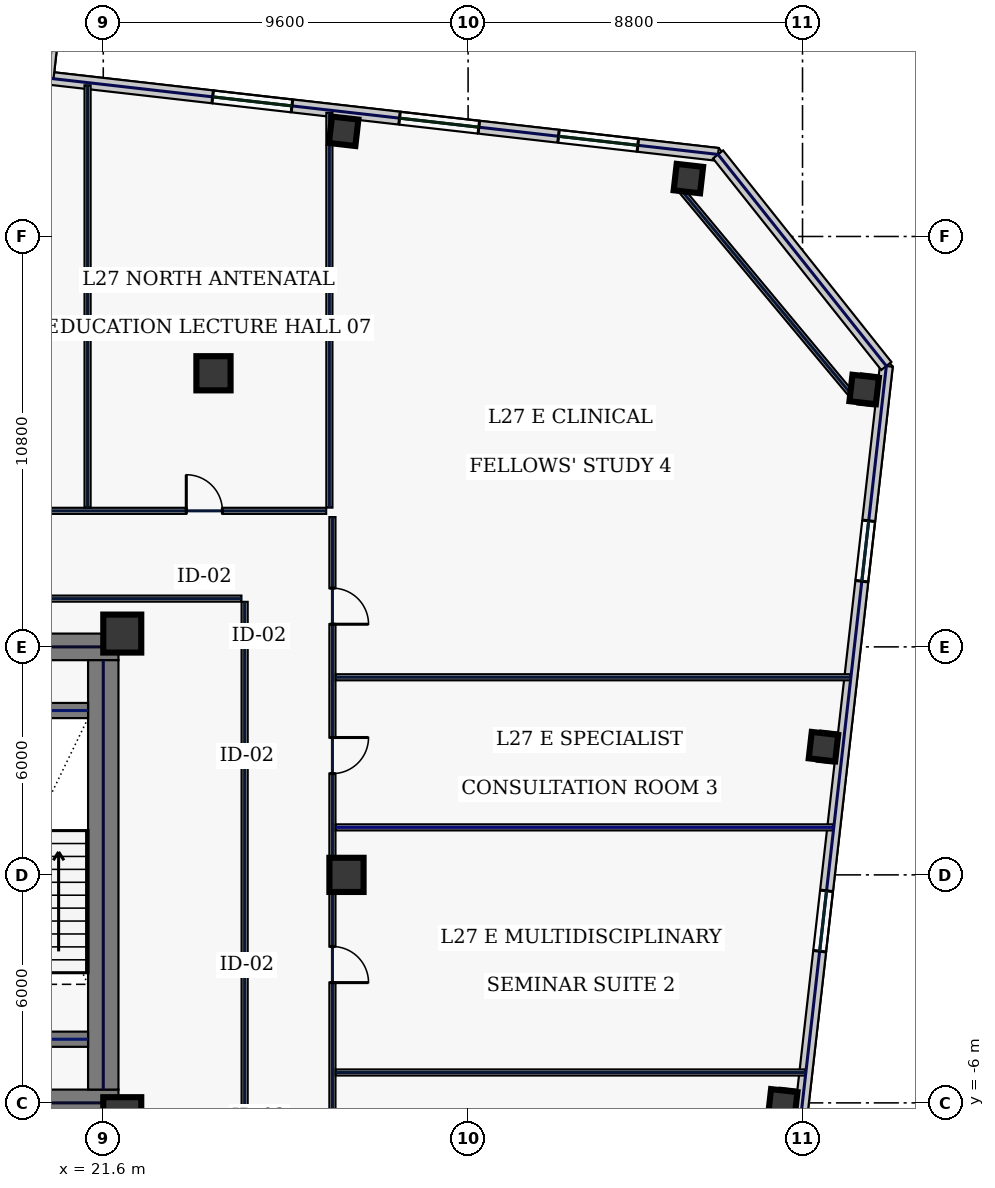
"""IFC4 building model, lengths in metres.
Left out: names, types, materials, properties, quantities, classifications, styles, units other than length and angle.
Written with IfcOpenShell. Run it as: python <this file> out.ifc"""

import sys

from ifc_helpers import new_model, si_unit, direction, frame, frame_2d, origin, origin_2d, place, context, subcontext, project, spatial, rectangle, hollow_rectangle, extrude, element, fill, save


model = new_model("IFC4")
c1 = context("Model", 3, precision=1e-05, world=origin(), true_north=direction((0.0, 1.0)))
c2 = subcontext(c1, "Body", "Model", "MODEL_VIEW")
j1 = project(units=[si_unit("LENGTHUNIT", "METRE"), si_unit("PLANEANGLEUNIT", "RADIAN")], contexts=[c1])
p1 = place(None, origin())
s1 = spatial("IfcSite", under=j1, at=p1, CompositionType="ELEMENT")
p2 = place(p1, origin())
s2 = spatial("IfcBuilding", under=s1, at=p2, CompositionType="ELEMENT")
p3 = place(p2, frame((0.0, 0.0, 121.4)))
s3 = spatial("IfcBuildingStorey", under=s2, at=p3, CompositionType="ELEMENT", Elevation=121.4)
for number, where, z_axis, x_axis in (
    (1, (10.45, 6.0, 0.0), (0.0, 0.0, 1.0), (1.0, 0.0, 0.0)),
    (2, (10.45, -6.0, 0.0), (0.0, 0.0, 1.0), (1.0, 0.0, 0.0)),
):
    element("IfcWall", number, at=place(p3, frame(where, z_axis=z_axis, x_axis=x_axis)), inside=s3, PredefinedType="SHEAR", context=c2, shape_type="SweptSolid", body=[
        extrude(rectangle(XDim=11.55, YDim=0.7, at=frame_2d((5.775, 0.0))), origin(), (0.0, 0.0, 1.0), 3.74),
    ])
p4 = place(p3, frame((21.6, -5.65, 0.0), z_axis=(0.0, 0.0, 1.0), x_axis=(0.0, 1.0, 0.0)))
e3 = element("IfcWall", 3, at=p4, inside=s3, PredefinedType="SHEAR", context=c2, shape_type="SweptSolid", body=[
    extrude(rectangle(XDim=11.3, YDim=0.8, at=frame_2d((5.65, 0.0))), origin(), (0.0, 0.0, 1.0), 3.74),
])
for number, where, z_axis, x_axis in (
    (4, (17.8, -4.325, 0.0), (0.0, 0.0, 1.0), (1.0, 0.0, 0.0)),
    (5, (17.8, 4.325, 0.0), (0.0, 0.0, 1.0), (1.0, 0.0, 0.0)),
):
    element("IfcWall", number, at=place(p3, frame(where, z_axis=z_axis, x_axis=x_axis)), inside=s3, PredefinedType="SHEAR", context=c2, shape_type="SweptSolid", body=[
        extrude(rectangle(XDim=3.4, YDim=0.4, at=frame_2d((1.7, 0.0))), origin(), (0.0, 0.0, 1.0), 3.74),
    ])
for number, where, z_axis, x_axis in (
    (6, (22.1, -6.35, 0.0), (0.0, 0.0, 1.0), (1.0, 0.0, 0.0)),
    (7, (22.1, 6.35, 0.0), (0.0, 0.0, 1.0), (1.0, 0.0, 0.0)),
):
    element("IfcColumn", number, at=place(p3, frame(where, z_axis=z_axis, x_axis=x_axis)), inside=s3, PredefinedType="COLUMN", context=c2, shape_type="SweptSolid", body=[
        extrude(hollow_rectangle(XDim=1.0, YDim=1.0, WallThickness=0.045, at=origin_2d()), origin(), (0.0, 0.0, 1.0), 3.74),
    ])
for number, where, z_axis, x_axis in (
    (8, (24.5, 13.2, 0.0), (0.0, 0.0, 1.0), (1.0, 0.0, 0.0)),
    (9, (28.0, 0.0, 0.0), (0.0, 0.0, 1.0), (1.0, 0.0, 0.0)),
):
    element("IfcColumn", number, at=place(p3, frame(where, z_axis=z_axis, x_axis=x_axis)), inside=s3, PredefinedType="COLUMN", context=c2, shape_type="SweptSolid", body=[
        extrude(hollow_rectangle(XDim=0.9, YDim=0.9, WallThickness=0.04, at=origin_2d()), origin(), (0.0, 0.0, 1.0), 3.74),
    ])
for number, where, z_axis, x_axis in (
    (10, (36.997, 18.323, 0.0), (0.0, 0.0, 1.0), (0.994, -0.113, 0.0)),
    (11, (27.926, 19.568, 0.0), (0.0, 0.0, 1.0), (0.994, -0.113, 0.0)),
    (12, (39.48, -6.025, 0.0), (0.0, 0.0, 1.0), (0.994, -0.113, 0.0)),
    (13, (40.551, 3.375, 0.0), (0.0, 0.0, 1.0), (0.994, -0.113, 0.0)),
    (14, (41.622, 12.774, 0.0), (0.0, 0.0, 1.0), (0.994, -0.113, 0.0)),
):
    element("IfcColumn", number, at=place(p3, frame(where, z_axis=z_axis, x_axis=x_axis)), inside=s3, PredefinedType="COLUMN", context=c2, shape_type="SweptSolid", body=[
        extrude(hollow_rectangle(XDim=0.7, YDim=0.7, WallThickness=0.032, at=origin_2d()), origin(), (0.0, 0.0, 1.0), 3.74),
    ])
p5 = place(p3, frame((37.777, 18.958, 0.0), z_axis=(0.0, 0.0, 1.0), x_axis=(-0.993570699365, 0.113213362125, 0.0)))
e15 = element("IfcWall", 15, at=p5, inside=s3, PredefinedType="STANDARD", context=c2, shape_type="SweptSolid", body=[
    extrude(rectangle(XDim=17.75, YDim=0.34, at=frame_2d((8.875, 0.0))), origin(), (0.0, 0.0, 1.0), 3.74),
])
p6 = place(p5, frame((11.285, 0.0, 0.67)))
e16 = element("IfcOpeningElement", 16, at=p6, cuts=e15, PredefinedType="OPENING", context=c2, shape_type="SweptSolid", body=[
    extrude(rectangle(XDim=2.1, YDim=2.2, at=frame_2d((1.05, 1.1))), frame((0.0, 0.18, 0.0), z_axis=(0.0, -1.0, 0.0), x_axis=(1.0, 0.0, 0.0)), (0.0, 0.0, 1.0), 0.36),
])
p7 = place(p5, frame((6.336, 0.0, 0.67)))
e17 = element("IfcOpeningElement", 17, at=p7, cuts=e15, PredefinedType="OPENING", context=c2, shape_type="SweptSolid", body=[
    extrude(rectangle(XDim=2.1, YDim=2.2, at=frame_2d((1.05, 1.1))), frame((0.0, 0.18, 0.0), z_axis=(0.0, -1.0, 0.0), x_axis=(1.0, 0.0, 0.0)), (0.0, 0.0, 1.0), 0.36),
])
p8 = place(p5, frame((2.125, 0.0, 0.67)))
e18 = element("IfcOpeningElement", 18, at=p8, cuts=e15, PredefinedType="OPENING", context=c2, shape_type="SweptSolid", body=[
    extrude(rectangle(XDim=2.1, YDim=2.2, at=frame_2d((1.05, 1.1))), frame((0.0, 0.18, 0.0), z_axis=(0.0, -1.0, 0.0), x_axis=(1.0, 0.0, 0.0)), (0.0, 0.0, 1.0), 0.36),
])
p9 = place(p3, frame((37.768, -25.556, 0.0), z_axis=(0.0, 0.0, 1.0), x_axis=(0.113201605824, 0.993572038877, 0.0)))
e19 = element("IfcWall", 19, at=p9, inside=s3, PredefinedType="STANDARD", context=c2, shape_type="SweptSolid", body=[
    extrude(rectangle(XDim=39.2, YDim=0.34, at=frame_2d((19.6, 0.0))), origin(), (0.0, 0.0, 1.0), 3.74),
])
p10 = place(p9, frame((4.1, 0.0, 0.58)))
e20 = element("IfcOpeningElement", 20, at=p10, cuts=e19, PredefinedType="OPENING", context=c2, shape_type="SweptSolid", body=[
    extrude(rectangle(XDim=1.6, YDim=2.3, at=frame_2d((0.8, 1.15))), frame((0.0, 0.18, 0.0), z_axis=(0.0, -1.0, 0.0), x_axis=(1.0, 0.0, 0.0)), (0.0, 0.0, 1.0), 0.36),
])
p11 = place(p9, frame((13.9, 0.0, 0.58)))
e21 = element("IfcOpeningElement", 21, at=p11, cuts=e19, PredefinedType="OPENING", context=c2, shape_type="SweptSolid", body=[
    extrude(rectangle(XDim=1.6, YDim=2.3, at=frame_2d((0.8, 1.15))), frame((0.0, 0.18, 0.0), z_axis=(0.0, -1.0, 0.0), x_axis=(1.0, 0.0, 0.0)), (0.0, 0.0, 1.0), 0.36),
])
p12 = place(p9, frame((23.7, 0.0, 0.58)))
e22 = element("IfcOpeningElement", 22, at=p12, cuts=e19, PredefinedType="OPENING", context=c2, shape_type="SweptSolid", body=[
    extrude(rectangle(XDim=1.6, YDim=2.3, at=frame_2d((0.8, 1.15))), frame((0.0, 0.18, 0.0), z_axis=(0.0, -1.0, 0.0), x_axis=(1.0, 0.0, 0.0)), (0.0, 0.0, 1.0), 0.36),
])
p13 = place(p9, frame((33.5, 0.0, 0.58)))
e23 = element("IfcOpeningElement", 23, at=p13, cuts=e19, PredefinedType="OPENING", context=c2, shape_type="SweptSolid", body=[
    extrude(rectangle(XDim=1.6, YDim=2.3, at=frame_2d((0.8, 1.15))), frame((0.0, 0.18, 0.0), z_axis=(0.0, -1.0, 0.0), x_axis=(1.0, 0.0, 0.0)), (0.0, 0.0, 1.0), 0.36),
])
p14 = place(p3, frame((42.206, 13.392, 0.0), z_axis=(0.0, 0.0, 1.0), x_axis=(-0.622524521309, 0.782600294128, 0.0)))
e24 = element("IfcWall", 24, at=p14, inside=s3, PredefinedType="STANDARD", context=c2, shape_type="SweptSolid", body=[
    extrude(rectangle(XDim=7.113, YDim=0.34, at=frame_2d((3.557, 0.0))), origin(), (0.0, 0.0, 1.0), 3.74),
])
p15 = place(p3, frame((20.141, 20.968, 0.0), z_axis=(0.0, 0.0, 1.0), x_axis=(0.113222704107, 0.993569634839, 0.0)))
e25 = element("IfcWall", 25, at=p15, inside=s3, PredefinedType="STANDARD", context=c2, shape_type="SweptSolid", body=[
    extrude(rectangle(XDim=2.87, YDim=0.3, at=frame_2d((1.435, 0.0))), origin(), (0.0, 0.0, 1.0), 3.285),
])
p16 = place(p3, frame((41.361, 12.556, 0.0), z_axis=(0.0, 0.0, 1.0), x_axis=(-0.640217638562, 0.768193579298, 0.0)))
e26 = element("IfcWall", 26, at=p16, inside=s3, PredefinedType="PARTITIONING", context=c2, shape_type="SweptSolid", body=[
    extrude(rectangle(XDim=7.224, YDim=0.16, at=frame_2d((3.612, 0.0))), origin(), (0.0, 0.0, 1.0), 3.74),
])
p17 = place(p3, frame((16.765, 9.58, 0.0), z_axis=(0.0, 0.0, 1.0), x_axis=(1.0, 0.0, 0.0)))
e27 = element("IfcWall", 27, at=p17, inside=s3, PredefinedType="PARTITIONING", context=c2, shape_type="SweptSolid", body=[
    extrude(rectangle(XDim=10.7, YDim=0.16, at=frame_2d((5.35, 0.0))), origin(), (0.0, 0.0, 1.0), 3.74),
])
p18 = place(p17, frame((7.019, 0.0, 0.0)))
e28 = element("IfcOpeningElement", 28, at=p18, cuts=e27, PredefinedType="OPENING", context=c2, shape_type="SweptSolid", body=[
    extrude(rectangle(XDim=0.95, YDim=2.2, at=frame_2d((0.475, 1.1))), frame((0.0, 0.09, 0.0), z_axis=(0.0, -1.0, 0.0), x_axis=(1.0, 0.0, 0.0)), (0.0, 0.0, 1.0), 0.18),
])
p19 = place(p3, frame((27.63, 9.415, 0.0), z_axis=(0.0, 0.0, 1.0), x_axis=(0.0, -1.0, 0.0)))
e29 = element("IfcWall", 29, at=p19, inside=s3, PredefinedType="PARTITIONING", context=c2, shape_type="SweptSolid", body=[
    extrude(rectangle(XDim=18.63, YDim=0.16, at=frame_2d((9.315, 0.0))), origin(), (0.0, 0.0, 1.0), 3.74),
])
p20 = place(p19, frame((16.081, 0.0, 0.0)))
e30 = element("IfcOpeningElement", 30, at=p20, cuts=e29, PredefinedType="OPENING", context=c2, shape_type="SweptSolid", body=[
    extrude(rectangle(XDim=0.95, YDim=2.2, at=frame_2d((0.475, 1.1))), frame((0.0, 0.09, 0.0), z_axis=(0.0, -1.0, 0.0), x_axis=(1.0, 0.0, 0.0)), (0.0, 0.0, 1.0), 0.18),
])
p21 = place(p19, frame((11.3, 0.0, 0.0)))
e31 = element("IfcOpeningElement", 31, at=p21, cuts=e29, PredefinedType="OPENING", context=c2, shape_type="SweptSolid", body=[
    extrude(rectangle(XDim=0.95, YDim=2.2, at=frame_2d((0.475, 1.1))), frame((0.0, 0.09, 0.0), z_axis=(0.0, -1.0, 0.0), x_axis=(1.0, 0.0, 0.0)), (0.0, 0.0, 1.0), 0.18),
])
p22 = place(p19, frame((5.8, 0.0, 0.0)))
e32 = element("IfcOpeningElement", 32, at=p22, cuts=e29, PredefinedType="OPENING", context=c2, shape_type="SweptSolid", body=[
    extrude(rectangle(XDim=0.95, YDim=2.2, at=frame_2d((0.475, 1.1))), frame((0.0, 0.09, 0.0), z_axis=(0.0, -1.0, 0.0), x_axis=(1.0, 0.0, 0.0)), (0.0, 0.0, 1.0), 0.18),
])
p23 = place(p19, frame((1.869, 0.0, 0.0)))
e33 = element("IfcOpeningElement", 33, at=p23, cuts=e29, PredefinedType="OPENING", context=c2, shape_type="SweptSolid", body=[
    extrude(rectangle(XDim=0.95, YDim=2.2, at=frame_2d((0.475, 1.1))), frame((0.0, 0.09, 0.0), z_axis=(0.0, -1.0, 0.0), x_axis=(1.0, 0.0, 0.0)), (0.0, 0.0, 1.0), 0.18),
])
p24 = place(p3, frame((25.235, 7.27, 0.0), z_axis=(0.0, 0.0, 1.0), x_axis=(-1.0, 0.0, 0.0)))
e34 = element("IfcWall", 34, at=p24, inside=s3, PredefinedType="PARTITIONING", context=c2, shape_type="SweptSolid", body=[
    extrude(rectangle(XDim=14.57, YDim=0.16, at=frame_2d((7.285, 0.0))), origin(), (0.0, 0.0, 1.0), 3.74),
])
p25 = place(p3, frame((25.32, -6.985, 0.0), z_axis=(0.0, 0.0, 1.0), x_axis=(0.0, 1.0, 0.0)))
e35 = element("IfcWall", 35, at=p25, inside=s3, PredefinedType="PARTITIONING", context=c2, shape_type="SweptSolid", body=[
    extrude(rectangle(XDim=14.17, YDim=0.16, at=frame_2d((7.085, 0.0))), origin(), (0.0, 0.0, 1.0), 3.74),
])
p26 = place(p3, frame((27.55, 9.665, 0.0), z_axis=(0.0, 0.0, 1.0), x_axis=(0.0, 1.0, 0.0)))
e36 = element("IfcWall", 36, at=p26, inside=s3, PredefinedType="PARTITIONING", context=c2, shape_type="SweptSolid", body=[
    extrude(rectangle(XDim=10.388, YDim=0.16, at=frame_2d((5.194, 0.0))), origin(), (0.0, 0.0, 1.0), 3.74),
])
p27 = place(p3, frame((21.187, 9.665, 0.0), z_axis=(0.0, 0.0, 1.0), x_axis=(0.0, 1.0, 0.0)))
e37 = element("IfcWall", 37, at=p27, inside=s3, PredefinedType="PARTITIONING", context=c2, shape_type="SweptSolid", body=[
    extrude(rectangle(XDim=11.113, YDim=0.16, at=frame_2d((5.557, 0.0))), origin(), (0.0, 0.0, 1.0), 3.285),
])
p28 = place(p3, frame((27.715, -5.2, 0.0), z_axis=(0.0, 0.0, 1.0), x_axis=(1.0, 0.0, 0.0)))
e38 = element("IfcWall", 38, at=p28, inside=s3, PredefinedType="PARTITIONING", context=c2, shape_type="SweptSolid", body=[
    extrude(rectangle(XDim=12.352, YDim=0.16, at=frame_2d((6.176, 0.0))), origin(), (0.0, 0.0, 1.0), 3.74),
])
p29 = place(p3, frame((27.715, 1.25, 0.0), z_axis=(0.0, 0.0, 1.0), x_axis=(1.0, 0.0, 0.0)))
e39 = element("IfcWall", 39, at=p29, inside=s3, PredefinedType="PARTITIONING", context=c2, shape_type="SweptSolid", body=[
    extrude(rectangle(XDim=13.087, YDim=0.16, at=frame_2d((6.543, 0.0))), origin(), (0.0, 0.0, 1.0), 3.235),
])
p30 = place(p3, frame((27.715, 5.2, 0.0), z_axis=(0.0, 0.0, 1.0), x_axis=(1.0, 0.0, 0.0)))
e40 = element("IfcWall", 40, at=p30, inside=s3, PredefinedType="PARTITIONING", context=c2, shape_type="SweptSolid", body=[
    extrude(rectangle(XDim=13.537, YDim=0.16, at=frame_2d((6.769, 0.0))), origin(), (0.0, 0.0, 1.0), 3.74),
])
p31 = place(p6, origin())
e41 = element("IfcWindow", 41, at=p31, inside=s3, PartitioningType="SINGLE_PANEL", PredefinedType="WINDOW", context=c2, shape_type="SweptSolid", body=[
    extrude(rectangle(XDim=2.1, YDim=2.2, at=frame_2d((1.05, 1.1))), frame((0.0, 0.03, 0.0), z_axis=(0.0, -1.0, 0.0), x_axis=(1.0, 0.0, 0.0)), (0.0, 0.0, 1.0), 0.06),
])
fill(e16, e41)
p32 = place(p7, origin())
e42 = element("IfcWindow", 42, at=p32, inside=s3, PartitioningType="SINGLE_PANEL", PredefinedType="WINDOW", context=c2, shape_type="SweptSolid", body=[
    extrude(rectangle(XDim=2.1, YDim=2.2, at=frame_2d((1.05, 1.1))), frame((0.0, 0.03, 0.0), z_axis=(0.0, -1.0, 0.0), x_axis=(1.0, 0.0, 0.0)), (0.0, 0.0, 1.0), 0.06),
])
fill(e17, e42)
p33 = place(p8, origin())
e43 = element("IfcWindow", 43, at=p33, inside=s3, PartitioningType="SINGLE_PANEL", PredefinedType="WINDOW", context=c2, shape_type="SweptSolid", body=[
    extrude(rectangle(XDim=2.1, YDim=2.2, at=frame_2d((1.05, 1.1))), frame((0.0, 0.03, 0.0), z_axis=(0.0, -1.0, 0.0), x_axis=(1.0, 0.0, 0.0)), (0.0, 0.0, 1.0), 0.06),
])
fill(e18, e43)
p34 = place(p12, origin())
e44 = element("IfcWindow", 44, at=p34, inside=s3, PartitioningType="SINGLE_PANEL", PredefinedType="WINDOW", context=c2, shape_type="SweptSolid", body=[
    extrude(rectangle(XDim=1.6, YDim=2.3, at=frame_2d((0.8, 1.15))), frame((0.0, 0.03, 0.0), z_axis=(0.0, -1.0, 0.0), x_axis=(1.0, 0.0, 0.0)), (0.0, 0.0, 1.0), 0.06),
])
fill(e22, e44)
p35 = place(p13, origin())
e45 = element("IfcWindow", 45, at=p35, inside=s3, PartitioningType="SINGLE_PANEL", PredefinedType="WINDOW", context=c2, shape_type="SweptSolid", body=[
    extrude(rectangle(XDim=1.6, YDim=2.3, at=frame_2d((0.8, 1.15))), frame((0.0, 0.03, 0.0), z_axis=(0.0, -1.0, 0.0), x_axis=(1.0, 0.0, 0.0)), (0.0, 0.0, 1.0), 0.06),
])
fill(e23, e45)
p36 = place(p18, origin())
e46 = element("IfcDoor", 46, at=p36, inside=s3, OperationType="SINGLE_SWING_LEFT", PredefinedType="DOOR", context=c2, shape_type="SweptSolid", body=[
    extrude(rectangle(XDim=0.95, YDim=2.2, at=frame_2d((0.475, 1.1))), frame((0.0, 0.025, 0.0), z_axis=(0.0, -1.0, 0.0), x_axis=(1.0, 0.0, 0.0)), (0.0, 0.0, 1.0), 0.05),
])
fill(e28, e46)
p37 = place(p21, origin())
e47 = element("IfcDoor", 47, at=p37, inside=s3, OperationType="SINGLE_SWING_RIGHT", PredefinedType="DOOR", context=c2, shape_type="SweptSolid", body=[
    extrude(rectangle(XDim=0.95, YDim=2.2, at=frame_2d((0.475, 1.1))), frame((0.0, 0.025, 0.0), z_axis=(0.0, -1.0, 0.0), x_axis=(1.0, 0.0, 0.0)), (0.0, 0.0, 1.0), 0.05),
])
fill(e31, e47)
p38 = place(p22, origin())
e48 = element("IfcDoor", 48, at=p38, inside=s3, OperationType="SINGLE_SWING_LEFT", PredefinedType="DOOR", context=c2, shape_type="SweptSolid", body=[
    extrude(rectangle(XDim=0.95, YDim=2.2, at=frame_2d((0.475, 1.1))), frame((0.0, 0.025, 0.0), z_axis=(0.0, -1.0, 0.0), x_axis=(1.0, 0.0, 0.0)), (0.0, 0.0, 1.0), 0.05),
])
fill(e32, e48)
p39 = place(p23, origin())
e49 = element("IfcDoor", 49, at=p39, inside=s3, OperationType="SINGLE_SWING_RIGHT", PredefinedType="DOOR", context=c2, shape_type="SweptSolid", body=[
    extrude(rectangle(XDim=0.95, YDim=2.2, at=frame_2d((0.475, 1.1))), frame((0.0, 0.025, 0.0), z_axis=(0.0, -1.0, 0.0), x_axis=(1.0, 0.0, 0.0)), (0.0, 0.0, 1.0), 0.05),
])
fill(e33, e49)
save(model, sys.argv[1])
